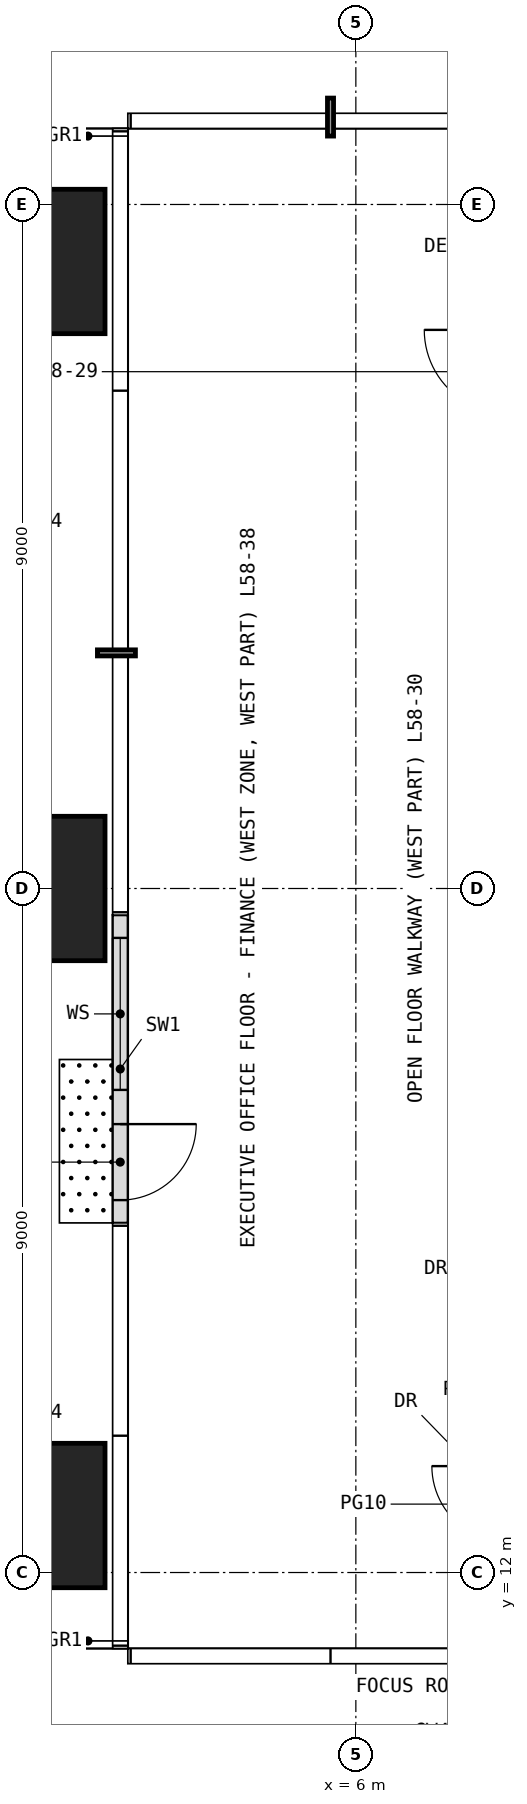
"""IFC4 building model, lengths in metres.
Left out: names, types, materials, properties, quantities, classifications, styles, units other than length and angle.
Written with IfcOpenShell. Run it as: python <this file> out.ifc"""

import sys

from ifc_helpers import new_model, si_unit, direction, frame, frame_2d, origin, origin_2d, place, context, subcontext, project, spatial, rectangle, extrude, element, fill, save


model = new_model("IFC4")
c1 = context("Model", 3, precision=1e-05, world=origin(), true_north=direction((0.0, 1.0)))
c2 = subcontext(c1, "Body", "Model", "MODEL_VIEW")
j1 = project(units=[si_unit("LENGTHUNIT", "METRE"), si_unit("PLANEANGLEUNIT", "RADIAN")], contexts=[c1])
p1 = place(None, origin())
s1 = spatial("IfcSite", under=j1, at=p1, CompositionType="ELEMENT")
p2 = place(p1, origin())
s2 = spatial("IfcBuilding", under=s1, at=p2, CompositionType="ELEMENT")
p3 = place(p2, frame((0.0, 0.0, 244.0)))
s3 = spatial("IfcBuildingStorey", under=s2, at=p3, CompositionType="ELEMENT", Elevation=244.0)
for number, where, z_axis, x_axis in (
    (1, (1.75, 12.75, 0.0), (0.0, 0.0, 1.0), (1.0, 0.0, 0.0)),
    (2, (1.75, 21.0, 0.0), (0.0, 0.0, 1.0), (1.0, 0.0, 0.0)),
    (3, (1.75, 29.25, 0.0), (0.0, 0.0, 1.0), (1.0, 0.0, 0.0)),
):
    element("IfcColumn", number, at=place(p3, frame(where, z_axis=z_axis, x_axis=x_axis)), inside=s3, PredefinedType="COLUMN", context=c2, shape_type="SweptSolid", body=[
        extrude(rectangle(XDim=1.9, YDim=1.9, at=origin_2d()), origin(), (0.0, 0.0, 1.0), 4.2),
    ])
p4 = place(p3, frame((2.9, 20.65, 0.0), z_axis=(0.0, 0.0, 1.0), x_axis=(0.0, -1.0, 0.0)))
e4 = element("IfcWall", 4, at=p4, inside=s3, PredefinedType="USERDEFINED", context=c2, shape_type="SweptSolid", body=[
    extrude(rectangle(XDim=4.05, YDim=0.2, at=frame_2d((2.025, 0.0))), origin(), (0.0, 0.0, 1.0), 3.95),
])
p5 = place(p4, frame((2.75, 0.0, 0.0)))
e5 = element("IfcOpeningElement", 5, at=p5, cuts=e4, PredefinedType="OPENING", context=c2, shape_type="SweptSolid", body=[
    extrude(rectangle(XDim=1.0, YDim=2.4, at=frame_2d((0.5, 1.2))), frame((0.0, 0.11, 0.0), z_axis=(0.0, -1.0, 0.0), x_axis=(1.0, 0.0, 0.0)), (0.0, 0.0, 1.0), 0.22),
])
p6 = place(p4, frame((0.3, 0.0, 0.3)))
e6 = element("IfcOpeningElement", 6, at=p6, cuts=e4, PredefinedType="OPENING", context=c2, shape_type="SweptSolid", body=[
    extrude(rectangle(XDim=2.0, YDim=2.7, at=frame_2d((1.0, 1.35))), frame((0.0, 0.11, 0.0), z_axis=(0.0, -1.0, 0.0), x_axis=(1.0, 0.0, 0.0)), (0.0, 0.0, 1.0), 0.22),
])
p7 = place(p5, origin())
e7 = element("IfcDoor", 7, at=p7, inside=s3, OperationType="SINGLE_SWING_LEFT", PredefinedType="DOOR", context=c2, shape_type="SweptSolid", body=[
    extrude(rectangle(XDim=1.0, YDim=2.4, at=frame_2d((0.5, 1.2))), frame((0.0, 0.025, 0.0), z_axis=(0.0, -1.0, 0.0), x_axis=(1.0, 0.0, 0.0)), (0.0, 0.0, 1.0), 0.05),
])
fill(e5, e7)
p8 = place(p6, origin())
e8 = element("IfcWindow", 8, at=p8, inside=s3, PartitioningType="SINGLE_PANEL", PredefinedType="WINDOW", context=c2, shape_type="SweptSolid", body=[
    extrude(rectangle(XDim=2.0, YDim=2.7, at=frame_2d((1.0, 1.35))), frame((0.0, 0.03, 0.0), z_axis=(0.0, -1.0, 0.0), x_axis=(1.0, 0.0, 0.0)), (0.0, 0.0, 1.0), 0.06),
])
fill(e6, e8)
save(model, sys.argv[1])
